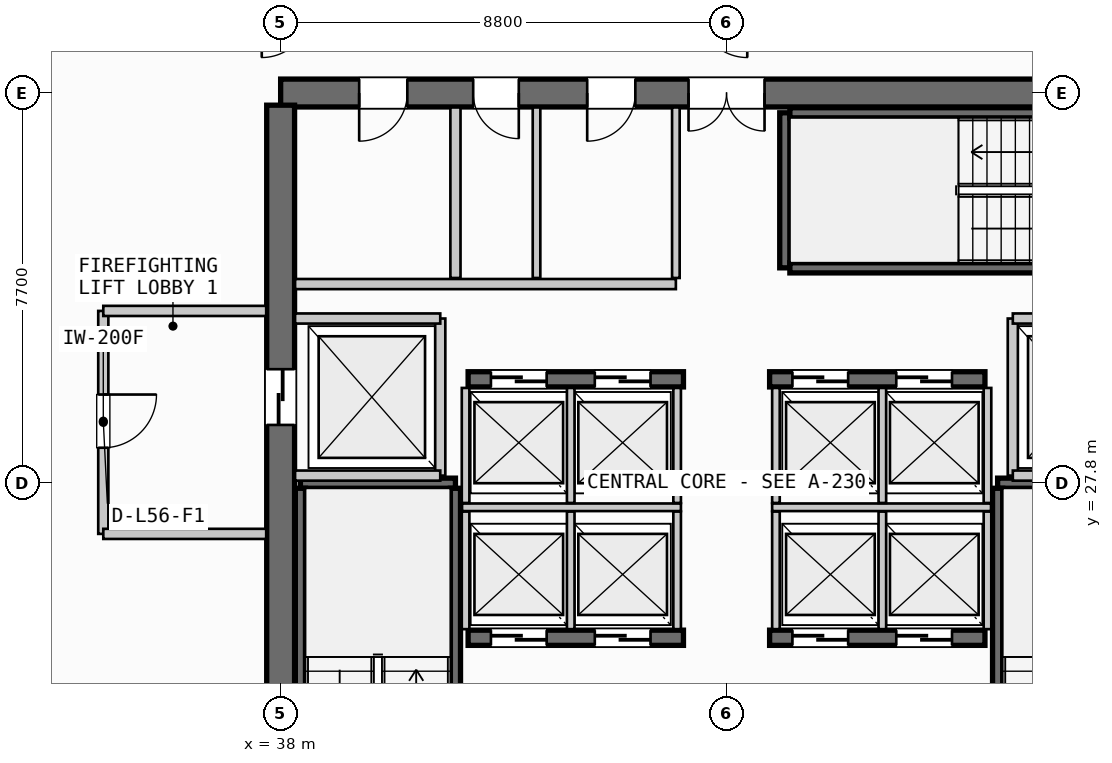
"""IFC4 building model, lengths in metres.
Left out: names, types, materials, properties, quantities, classifications, styles, units other than length and angle.
Written with IfcOpenShell. Run it as: python <this file> out.ifc"""

import sys

from ifc_helpers import new_model, si_unit, direction, frame, frame_2d, origin, place, context, subcontext, project, spatial, rectangle, extrude, source, transform, mapped, element, fill, save


model = new_model("IFC4")
c1 = context("Model", 3, precision=1e-05, world=origin(), true_north=direction((0.0, 1.0)))
c2 = subcontext(c1, "Body", "Model", "MODEL_VIEW")
j1 = project(units=[si_unit("LENGTHUNIT", "METRE"), si_unit("PLANEANGLEUNIT", "RADIAN")], contexts=[c1])
p1 = place(None, origin())
s1 = spatial("IfcSite", under=j1, at=p1, CompositionType="ELEMENT")
p2 = place(p1, origin())
s2 = spatial("IfcBuilding", under=s1, at=p2, CompositionType="ELEMENT")
p3 = place(p2, frame((0.0, 0.0, 214.9)))
s3 = spatial("IfcBuildingStorey", under=s2, at=p3, CompositionType="ELEMENT", Elevation=214.9)
p4 = place(p3, frame((55.6, 35.5, 0.0), z_axis=(0.0, 0.0, 1.0), x_axis=(-1.0, 0.0, 0.0)))
e1 = element("IfcWall", 1, at=p4, inside=s3, PredefinedType="SHEAR", context=c2, shape_type="SweptSolid", body=[
    extrude(rectangle(XDim=17.6, YDim=0.55, at=frame_2d((8.8, 0.0))), origin(), (0.0, 0.0, 1.0), 3.24),
])
p5 = place(p4, frame((8.05, 0.0, 0.0)))
e2 = element("IfcOpeningElement", 2, at=p5, cuts=e1, PredefinedType="OPENING", context=c2, shape_type="SweptSolid", body=[
    extrude(rectangle(XDim=1.5, YDim=2.2, at=frame_2d((0.75, 1.1))), frame((0.0, 0.285, 0.0), z_axis=(0.0, -1.0, 0.0), x_axis=(1.0, 0.0, 0.0)), (0.0, 0.0, 1.0), 0.57),
])
p6 = place(p4, frame((15.1, 0.0, 0.0)))
e3 = element("IfcOpeningElement", 3, at=p6, cuts=e1, PredefinedType="OPENING", context=c2, shape_type="SweptSolid", body=[
    extrude(rectangle(XDim=0.95, YDim=2.15, at=frame_2d((0.475, 1.075))), frame((0.0, 0.285, 0.0), z_axis=(0.0, -1.0, 0.0), x_axis=(1.0, 0.0, 0.0)), (0.0, 0.0, 1.0), 0.57),
])
p7 = place(p4, frame((12.9, 0.0, 0.0)))
e4 = element("IfcOpeningElement", 4, at=p7, cuts=e1, PredefinedType="OPENING", context=c2, shape_type="SweptSolid", body=[
    extrude(rectangle(XDim=0.9, YDim=2.15, at=frame_2d((0.45, 1.075))), frame((0.0, 0.285, 0.0), z_axis=(0.0, -1.0, 0.0), x_axis=(1.0, 0.0, 0.0)), (0.0, 0.0, 1.0), 0.57),
])
p8 = place(p4, frame((10.6, 0.0, 0.0)))
e5 = element("IfcOpeningElement", 5, at=p8, cuts=e1, PredefinedType="OPENING", context=c2, shape_type="SweptSolid", body=[
    extrude(rectangle(XDim=0.95, YDim=2.15, at=frame_2d((0.475, 1.075))), frame((0.0, 0.285, 0.0), z_axis=(0.0, -1.0, 0.0), x_axis=(1.0, 0.0, 0.0)), (0.0, 0.0, 1.0), 0.57),
])
p9 = place(p3, frame((38.0, 35.26, 0.0), z_axis=(0.0, 0.0, 1.0), x_axis=(0.0, -1.0, 0.0)))
e6 = element("IfcWall", 6, at=p9, inside=s3, PredefinedType="SHEAR", context=c2, shape_type="SweptSolid", body=[
    extrude(rectangle(XDim=14.92, YDim=0.55, at=frame_2d((7.46, 0.0))), origin(), (0.0, 0.0, 1.0), 3.24),
])
p10 = place(p9, frame((5.21, 0.0, 0.0)))
e7 = element("IfcOpeningElement", 7, at=p10, cuts=e6, PredefinedType="OPENING", context=c2, shape_type="SweptSolid", body=[
    extrude(rectangle(XDim=1.1, YDim=2.2, at=frame_2d((0.55, 1.1))), frame((0.0, 0.285, 0.0), z_axis=(0.0, -1.0, 0.0), x_axis=(1.0, 0.0, 0.0)), (0.0, 0.0, 1.0), 0.57),
])
p11 = place(p3, frame((41.7, 24.75, 0.0), z_axis=(0.0, 0.0, 1.0), x_axis=(1.0, 0.0, 0.0)))
e8 = element("IfcWall", 8, at=p11, inside=s3, PredefinedType="SHEAR", context=c2, shape_type="SweptSolid", body=[
    extrude(rectangle(XDim=4.25, YDim=0.3, at=frame_2d((2.125, 0.0))), origin(), (0.0, 0.0, 1.0), 3.24),
])
p12 = place(p11, frame((0.45, 0.0, 0.0)))
e9 = element("IfcOpeningElement", 9, at=p12, cuts=e8, PredefinedType="OPENING", context=c2, shape_type="SweptSolid", body=[
    extrude(rectangle(XDim=1.1, YDim=2.2, at=frame_2d((0.55, 1.1))), frame((0.0, 0.16, 0.0), z_axis=(0.0, -1.0, 0.0), x_axis=(1.0, 0.0, 0.0)), (0.0, 0.0, 1.0), 0.32),
])
p13 = place(p11, frame((2.5, 0.0, 0.0)))
e10 = element("IfcOpeningElement", 10, at=p13, cuts=e8, PredefinedType="OPENING", context=c2, shape_type="SweptSolid", body=[
    extrude(rectangle(XDim=1.1, YDim=2.2, at=frame_2d((0.55, 1.1))), frame((0.0, 0.16, 0.0), z_axis=(0.0, -1.0, 0.0), x_axis=(1.0, 0.0, 0.0)), (0.0, 0.0, 1.0), 0.32),
])
p14 = place(p3, frame((47.65, 24.75, 0.0), z_axis=(0.0, 0.0, 1.0), x_axis=(1.0, 0.0, 0.0)))
e11 = element("IfcWall", 11, at=p14, inside=s3, PredefinedType="SHEAR", context=c2, shape_type="SweptSolid", body=[
    extrude(rectangle(XDim=4.25, YDim=0.3, at=frame_2d((2.125, 0.0))), origin(), (0.0, 0.0, 1.0), 3.24),
])
p15 = place(p14, frame((0.45, 0.0, 0.0)))
e12 = element("IfcOpeningElement", 12, at=p15, cuts=e11, PredefinedType="OPENING", context=c2, shape_type="SweptSolid", body=[
    extrude(rectangle(XDim=1.1, YDim=2.2, at=frame_2d((0.55, 1.1))), frame((0.0, 0.16, 0.0), z_axis=(0.0, -1.0, 0.0), x_axis=(1.0, 0.0, 0.0)), (0.0, 0.0, 1.0), 0.32),
])
p16 = place(p14, frame((2.5, 0.0, 0.0)))
e13 = element("IfcOpeningElement", 13, at=p16, cuts=e11, PredefinedType="OPENING", context=c2, shape_type="SweptSolid", body=[
    extrude(rectangle(XDim=1.1, YDim=2.2, at=frame_2d((0.55, 1.1))), frame((0.0, 0.16, 0.0), z_axis=(0.0, -1.0, 0.0), x_axis=(1.0, 0.0, 0.0)), (0.0, 0.0, 1.0), 0.32),
])
p17 = place(p3, frame((41.7, 29.85, 0.0), z_axis=(0.0, 0.0, 1.0), x_axis=(1.0, 0.0, 0.0)))
e14 = element("IfcWall", 14, at=p17, inside=s3, PredefinedType="SHEAR", context=c2, shape_type="SweptSolid", body=[
    extrude(rectangle(XDim=4.25, YDim=0.3, at=frame_2d((2.125, 0.0))), origin(), (0.0, 0.0, 1.0), 3.24),
])
p18 = place(p17, frame((0.45, 0.0, 0.0)))
e15 = element("IfcOpeningElement", 15, at=p18, cuts=e14, PredefinedType="OPENING", context=c2, shape_type="SweptSolid", body=[
    extrude(rectangle(XDim=1.1, YDim=2.2, at=frame_2d((0.55, 1.1))), frame((0.0, 0.16, 0.0), z_axis=(0.0, -1.0, 0.0), x_axis=(1.0, 0.0, 0.0)), (0.0, 0.0, 1.0), 0.32),
])
p19 = place(p17, frame((2.5, 0.0, 0.0)))
e16 = element("IfcOpeningElement", 16, at=p19, cuts=e14, PredefinedType="OPENING", context=c2, shape_type="SweptSolid", body=[
    extrude(rectangle(XDim=1.1, YDim=2.2, at=frame_2d((0.55, 1.1))), frame((0.0, 0.16, 0.0), z_axis=(0.0, -1.0, 0.0), x_axis=(1.0, 0.0, 0.0)), (0.0, 0.0, 1.0), 0.32),
])
p20 = place(p3, frame((47.65, 29.85, 0.0), z_axis=(0.0, 0.0, 1.0), x_axis=(1.0, 0.0, 0.0)))
e17 = element("IfcWall", 17, at=p20, inside=s3, PredefinedType="SHEAR", context=c2, shape_type="SweptSolid", body=[
    extrude(rectangle(XDim=4.25, YDim=0.3, at=frame_2d((2.125, 0.0))), origin(), (0.0, 0.0, 1.0), 3.24),
])
p21 = place(p20, frame((0.45, 0.0, 0.0)))
e18 = element("IfcOpeningElement", 18, at=p21, cuts=e17, PredefinedType="OPENING", context=c2, shape_type="SweptSolid", body=[
    extrude(rectangle(XDim=1.1, YDim=2.2, at=frame_2d((0.55, 1.1))), frame((0.0, 0.16, 0.0), z_axis=(0.0, -1.0, 0.0), x_axis=(1.0, 0.0, 0.0)), (0.0, 0.0, 1.0), 0.32),
])
p22 = place(p20, frame((2.5, 0.0, 0.0)))
e19 = element("IfcOpeningElement", 19, at=p22, cuts=e17, PredefinedType="OPENING", context=c2, shape_type="SweptSolid", body=[
    extrude(rectangle(XDim=1.1, YDim=2.2, at=frame_2d((0.55, 1.1))), frame((0.0, 0.16, 0.0), z_axis=(0.0, -1.0, 0.0), x_axis=(1.0, 0.0, 0.0)), (0.0, 0.0, 1.0), 0.32),
])
p23 = place(p3, frame((38.39, 27.8, 0.0), z_axis=(0.0, 0.0, 1.0), x_axis=(1.0, 0.0, 0.0)))
e20 = element("IfcWall", 20, at=p23, inside=s3, PredefinedType="SHEAR", context=c2, shape_type="SweptSolid", body=[
    extrude(rectangle(XDim=3.06, YDim=0.2, at=frame_2d((1.53, 0.0))), origin(), (0.0, 0.0, 1.0), 3.24),
])
for number, where, z_axis, x_axis in (
    (21, (41.45, 27.7, 0.0), (0.0, 0.0, 1.0), (0.0, -1.0, 0.0)),
    (22, (38.39, 20.35, 0.0), (0.0, 0.0, 1.0), (0.0, 1.0, 0.0)),
):
    element("IfcWall", number, at=place(p3, frame(where, z_axis=z_axis, x_axis=x_axis)), inside=s3, PredefinedType="SHEAR", context=c2, shape_type="SweptSolid", body=[
        extrude(rectangle(XDim=7.35, YDim=0.2, at=frame_2d((3.675, 0.0))), origin(), (0.0, 0.0, 1.0), 3.24),
    ])
p24 = place(p3, frame((52.15, 27.8, 0.0), z_axis=(0.0, 0.0, 1.0), x_axis=(1.0, 0.0, 0.0)))
e23 = element("IfcWall", 23, at=p24, inside=s3, PredefinedType="SHEAR", context=c2, shape_type="SweptSolid", body=[
    extrude(rectangle(XDim=3.06, YDim=0.2, at=frame_2d((1.53, 0.0))), origin(), (0.0, 0.0, 1.0), 3.24),
])
p25 = place(p3, frame((52.15, 20.35, 0.0), z_axis=(0.0, 0.0, 1.0), x_axis=(0.0, 1.0, 0.0)))
e24 = element("IfcWall", 24, at=p25, inside=s3, PredefinedType="SHEAR", context=c2, shape_type="SweptSolid", body=[
    extrude(rectangle(XDim=7.35, YDim=0.2, at=frame_2d((3.675, 0.0))), origin(), (0.0, 0.0, 1.0), 3.24),
])
p26 = place(p3, frame((47.95, 32.05, 0.0), z_axis=(0.0, 0.0, 1.0), x_axis=(0.0, 1.0, 0.0)))
e25 = element("IfcWall", 25, at=p26, inside=s3, PredefinedType="SHEAR", context=c2, shape_type="SweptSolid", body=[
    extrude(rectangle(XDim=3.06, YDim=0.2, at=frame_2d((1.53, 0.0))), origin(), (0.0, 0.0, 1.0), 3.24),
])
for number, where, z_axis, x_axis in (
    (26, (48.05, 35.11, 0.0), (0.0, 0.0, 1.0), (1.0, 0.0, 0.0)),
    (27, (55.4, 32.05, 0.0), (0.0, 0.0, 1.0), (-1.0, 0.0, 0.0)),
):
    element("IfcWall", number, at=place(p3, frame(where, z_axis=z_axis, x_axis=x_axis)), inside=s3, PredefinedType="SHEAR", context=c2, shape_type="SweptSolid", body=[
        extrude(rectangle(XDim=7.35, YDim=0.2, at=frame_2d((3.675, 0.0))), origin(), (0.0, 0.0, 1.0), 3.24),
    ])
p27 = place(p3, frame((41.15, 27.95, 0.0), z_axis=(0.0, 0.0, 1.0), x_axis=(0.0, 1.0, 0.0)))
e28 = element("IfcWall", 28, at=p27, inside=s3, PredefinedType="PARTITIONING", context=c2, shape_type="SweptSolid", body=[
    extrude(rectangle(XDim=3.1, YDim=0.2, at=frame_2d((1.55, 0.0))), origin(), (0.0, 0.0, 1.0), 2.295),
])
for number, where, z_axis, x_axis in (
    (29, (38.285, 27.95, 0.0), (0.0, 0.0, 1.0), (1.0, 0.0, 0.0)),
    (30, (38.285, 31.05, 0.0), (0.0, 0.0, 1.0), (1.0, 0.0, 0.0)),
):
    element("IfcWall", number, at=place(p3, frame(where, z_axis=z_axis, x_axis=x_axis)), inside=s3, PredefinedType="PARTITIONING", context=c2, shape_type="SweptSolid", body=[
        extrude(rectangle(XDim=2.865, YDim=0.2, at=frame_2d((1.433, 0.0))), origin(), (0.0, 0.0, 1.0), 2.295),
    ])
p28 = place(p3, frame((34.5, 31.2, 0.0), z_axis=(0.0, 0.0, 1.0), x_axis=(0.0, -1.0, 0.0)))
e31 = element("IfcWall", 31, at=p28, inside=s3, PredefinedType="PARTITIONING", context=c2, shape_type="SweptSolid", body=[
    extrude(rectangle(XDim=4.4, YDim=0.2, at=frame_2d((2.2, 0.0))), origin(), (0.0, 0.0, 1.0), 2.295),
])
p29 = place(p28, frame((1.65, 0.0, 0.0)))
e32 = element("IfcOpeningElement", 32, at=p29, cuts=e31, PredefinedType="OPENING", context=c2, shape_type="SweptSolid", body=[
    extrude(rectangle(XDim=1.05, YDim=2.15, at=frame_2d((0.525, 1.075))), frame((0.0, 0.11, 0.0), z_axis=(0.0, -1.0, 0.0), x_axis=(1.0, 0.0, 0.0)), (0.0, 0.0, 1.0), 0.22),
])
for number, where, z_axis, x_axis in (
    (33, (34.5, 26.8, 0.0), (0.0, 0.0, 1.0), (1.0, 0.0, 0.0)),
    (34, (34.5, 31.2, 0.0), (0.0, 0.0, 1.0), (1.0, 0.0, 0.0)),
):
    element("IfcWall", number, at=place(p3, frame(where, z_axis=z_axis, x_axis=x_axis)), inside=s3, PredefinedType="PARTITIONING", context=c2, shape_type="SweptSolid", body=[
        extrude(rectangle(XDim=3.215, YDim=0.2, at=frame_2d((1.607, 0.0))), origin(), (0.0, 0.0, 1.0), 2.295),
    ])
p30 = place(p3, frame((52.45, 27.95, 0.0), z_axis=(0.0, 0.0, 1.0), x_axis=(0.0, 1.0, 0.0)))
e35 = element("IfcWall", 35, at=p30, inside=s3, PredefinedType="PARTITIONING", context=c2, shape_type="SweptSolid", body=[
    extrude(rectangle(XDim=3.1, YDim=0.2, at=frame_2d((1.55, 0.0))), origin(), (0.0, 0.0, 1.0), 2.295),
])
for number, where, z_axis, x_axis in (
    (36, (52.45, 27.95, 0.0), (0.0, 0.0, 1.0), (1.0, 0.0, 0.0)),
    (37, (52.45, 31.05, 0.0), (0.0, 0.0, 1.0), (1.0, 0.0, 0.0)),
):
    element("IfcWall", number, at=place(p3, frame(where, z_axis=z_axis, x_axis=x_axis)), inside=s3, PredefinedType="PARTITIONING", context=c2, shape_type="SweptSolid", body=[
        extrude(rectangle(XDim=2.865, YDim=0.2, at=frame_2d((1.433, 0.0))), origin(), (0.0, 0.0, 1.0), 2.295),
    ])
p31 = place(p3, frame((41.58, 27.325, 0.0), z_axis=(0.0, 0.0, 1.0), x_axis=(1.0, 0.0, 0.0)))
e38 = element("IfcWall", 38, at=p31, inside=s3, PredefinedType="PARTITIONING", context=c2, shape_type="SweptSolid", body=[
    extrude(rectangle(XDim=4.32, YDim=0.15, at=frame_2d((2.16, 0.0))), origin(), (0.0, 0.0, 1.0), 2.295),
])
p32 = place(p3, frame((47.7, 27.325, 0.0), z_axis=(0.0, 0.0, 1.0), x_axis=(1.0, 0.0, 0.0)))
e39 = element("IfcWall", 39, at=p32, inside=s3, PredefinedType="PARTITIONING", context=c2, shape_type="SweptSolid", body=[
    extrude(rectangle(XDim=4.32, YDim=0.15, at=frame_2d((2.16, 0.0))), origin(), (0.0, 0.0, 1.0), 2.295),
])
for number, where, z_axis, x_axis in (
    (40, (41.65, 24.92, 0.0), (0.0, 0.0, 1.0), (0.0, 1.0, 0.0)),
    (41, (43.725, 24.92, 0.0), (0.0, 0.0, 1.0), (0.0, 1.0, 0.0)),
    (42, (45.825, 24.92, 0.0), (0.0, 0.0, 1.0), (0.0, 1.0, 0.0)),
    (43, (47.775, 24.92, 0.0), (0.0, 0.0, 1.0), (0.0, 1.0, 0.0)),
    (44, (49.875, 24.92, 0.0), (0.0, 0.0, 1.0), (0.0, 1.0, 0.0)),
    (45, (51.95, 24.92, 0.0), (0.0, 0.0, 1.0), (0.0, 1.0, 0.0)),
):
    element("IfcWall", number, at=place(p3, frame(where, z_axis=z_axis, x_axis=x_axis)), inside=s3, PredefinedType="PARTITIONING", context=c2, shape_type="SweptSolid", body=[
        extrude(rectangle(XDim=2.32, YDim=0.15, at=frame_2d((1.16, 0.0))), origin(), (0.0, 0.0, 1.0), 2.295),
    ])
for number, where, z_axis, x_axis in (
    (46, (41.65, 27.41, 0.0), (0.0, 0.0, 1.0), (0.0, 1.0, 0.0)),
    (47, (43.725, 27.41, 0.0), (0.0, 0.0, 1.0), (0.0, 1.0, 0.0)),
    (48, (45.825, 27.41, 0.0), (0.0, 0.0, 1.0), (0.0, 1.0, 0.0)),
    (49, (47.775, 27.41, 0.0), (0.0, 0.0, 1.0), (0.0, 1.0, 0.0)),
    (50, (49.875, 27.41, 0.0), (0.0, 0.0, 1.0), (0.0, 1.0, 0.0)),
    (51, (51.95, 27.41, 0.0), (0.0, 0.0, 1.0), (0.0, 1.0, 0.0)),
):
    element("IfcWall", number, at=place(p3, frame(where, z_axis=z_axis, x_axis=x_axis)), inside=s3, PredefinedType="PARTITIONING", context=c2, shape_type="SweptSolid", body=[
        extrude(rectangle(XDim=2.27, YDim=0.15, at=frame_2d((1.135, 0.0))), origin(), (0.0, 0.0, 1.0), 2.295),
    ])
p33 = place(p3, frame((41.45, 31.85, 0.0), z_axis=(0.0, 0.0, 1.0), x_axis=(0.0, 1.0, 0.0)))
e52 = element("IfcWall", 52, at=p33, inside=s3, PredefinedType="PARTITIONING", context=c2, shape_type="SweptSolid", body=[
    extrude(rectangle(XDim=3.365, YDim=0.2, at=frame_2d((1.683, 0.0))), origin(), (0.0, 0.0, 1.0), 2.295),
])
p34 = place(p3, frame((38.285, 31.73, 0.0), z_axis=(0.0, 0.0, 1.0), x_axis=(1.0, 0.0, 0.0)))
e53 = element("IfcWall", 53, at=p34, inside=s3, PredefinedType="PARTITIONING", context=c2, shape_type="SweptSolid", body=[
    extrude(rectangle(XDim=7.515, YDim=0.2, at=frame_2d((3.758, 0.0))), origin(), (0.0, 0.0, 1.0), 2.295),
])
p35 = place(p3, frame((45.8, 31.85, 0.0), z_axis=(0.0, 0.0, 1.0), x_axis=(0.0, 1.0, 0.0)))
e54 = element("IfcWall", 54, at=p35, inside=s3, PredefinedType="PARTITIONING", context=c2, shape_type="SweptSolid", body=[
    extrude(rectangle(XDim=3.365, YDim=0.15, at=frame_2d((1.683, 0.0))), origin(), (0.0, 0.0, 1.0), 2.295),
])
p36 = place(p3, frame((43.05, 31.85, 0.0), z_axis=(0.0, 0.0, 1.0), x_axis=(0.0, 1.0, 0.0)))
e55 = element("IfcWall", 55, at=p36, inside=s3, PredefinedType="PLUMBINGWALL", context=c2, shape_type="SweptSolid", body=[
    extrude(rectangle(XDim=3.365, YDim=0.15, at=frame_2d((1.683, 0.0))), origin(), (0.0, 0.0, 1.0), 2.295),
])
m1 = source(origin(), c2, "Body", "SweptSolid", [
    extrude(rectangle(XDim=1.5, YDim=2.2, at=frame_2d((0.75, 1.1))), frame((0.0, 0.025, 0.0), z_axis=(0.0, -1.0, 0.0), x_axis=(1.0, 0.0, 0.0)), (0.0, 0.0, 1.0), 0.05),
])
p37 = place(p5, origin())
e56 = element("IfcDoor", 56, at=p37, inside=s3, OperationType="DOUBLE_DOOR_SINGLE_SWING", PredefinedType="DOOR", context=c2, shape_type="MappedRepresentation", body=[
    mapped(m1, transform((0.0, 0.0, 0.0), scale=1.0)),
])
fill(e2, e56)
m2 = source(origin(), c2, "Body", "SweptSolid", [
    extrude(rectangle(XDim=1.1, YDim=2.2, at=frame_2d((0.55, 1.1))), frame((0.0, 0.025, 0.0), z_axis=(0.0, -1.0, 0.0), x_axis=(1.0, 0.0, 0.0)), (0.0, 0.0, 1.0), 0.05),
])
p38 = place(p10, origin())
e57 = element("IfcDoor", 57, at=p38, inside=s3, OperationType="SLIDING_TO_LEFT", PredefinedType="DOOR", context=c2, shape_type="MappedRepresentation", body=[
    mapped(m2, transform((0.0, 0.0, 0.0), scale=1.0)),
])
fill(e7, e57)
p39 = place(p12, origin())
e58 = element("IfcDoor", 58, at=p39, inside=s3, OperationType="SLIDING_TO_RIGHT", PredefinedType="DOOR", context=c2, shape_type="MappedRepresentation", body=[
    mapped(m2, transform((0.0, 0.0, 0.0), scale=1.0)),
])
fill(e9, e58)
p40 = place(p13, origin())
e59 = element("IfcDoor", 59, at=p40, inside=s3, OperationType="SLIDING_TO_RIGHT", PredefinedType="DOOR", context=c2, shape_type="MappedRepresentation", body=[
    mapped(m2, transform((0.0, 0.0, 0.0), scale=1.0)),
])
fill(e10, e59)
p41 = place(p15, origin())
e60 = element("IfcDoor", 60, at=p41, inside=s3, OperationType="SLIDING_TO_RIGHT", PredefinedType="DOOR", context=c2, shape_type="MappedRepresentation", body=[
    mapped(m2, transform((0.0, 0.0, 0.0), scale=1.0)),
])
fill(e12, e60)
p42 = place(p16, origin())
e61 = element("IfcDoor", 61, at=p42, inside=s3, OperationType="SLIDING_TO_RIGHT", PredefinedType="DOOR", context=c2, shape_type="MappedRepresentation", body=[
    mapped(m2, transform((0.0, 0.0, 0.0), scale=1.0)),
])
fill(e13, e61)
p43 = place(p18, origin())
e62 = element("IfcDoor", 62, at=p43, inside=s3, OperationType="SLIDING_TO_LEFT", PredefinedType="DOOR", context=c2, shape_type="MappedRepresentation", body=[
    mapped(m2, transform((0.0, 0.0, 0.0), scale=1.0)),
])
fill(e15, e62)
p44 = place(p19, origin())
e63 = element("IfcDoor", 63, at=p44, inside=s3, OperationType="SLIDING_TO_LEFT", PredefinedType="DOOR", context=c2, shape_type="MappedRepresentation", body=[
    mapped(m2, transform((0.0, 0.0, 0.0), scale=1.0)),
])
fill(e16, e63)
p45 = place(p21, origin())
e64 = element("IfcDoor", 64, at=p45, inside=s3, OperationType="SLIDING_TO_LEFT", PredefinedType="DOOR", context=c2, shape_type="MappedRepresentation", body=[
    mapped(m2, transform((0.0, 0.0, 0.0), scale=1.0)),
])
fill(e18, e64)
p46 = place(p22, origin())
e65 = element("IfcDoor", 65, at=p46, inside=s3, OperationType="SLIDING_TO_LEFT", PredefinedType="DOOR", context=c2, shape_type="MappedRepresentation", body=[
    mapped(m2, transform((0.0, 0.0, 0.0), scale=1.0)),
])
fill(e19, e65)
m3 = source(origin(), c2, "Body", "SweptSolid", [
    extrude(rectangle(XDim=0.95, YDim=2.15, at=frame_2d((0.475, 1.075))), frame((0.0, 0.025, 0.0), z_axis=(0.0, -1.0, 0.0), x_axis=(1.0, 0.0, 0.0)), (0.0, 0.0, 1.0), 0.05),
])
p47 = place(p6, origin())
e66 = element("IfcDoor", 66, at=p47, inside=s3, OperationType="SINGLE_SWING_RIGHT", PredefinedType="DOOR", context=c2, shape_type="MappedRepresentation", body=[
    mapped(m3, transform((0.0, 0.0, 0.0), scale=1.0)),
])
fill(e3, e66)
m4 = source(origin(), c2, "Body", "SweptSolid", [
    extrude(rectangle(XDim=0.9, YDim=2.15, at=frame_2d((0.45, 1.075))), frame((0.0, 0.025, 0.0), z_axis=(0.0, -1.0, 0.0), x_axis=(1.0, 0.0, 0.0)), (0.0, 0.0, 1.0), 0.05),
])
p48 = place(p7, origin())
e67 = element("IfcDoor", 67, at=p48, inside=s3, OperationType="SINGLE_SWING_LEFT", PredefinedType="DOOR", context=c2, shape_type="MappedRepresentation", body=[
    mapped(m4, transform((0.0, 0.0, 0.0), scale=1.0)),
])
fill(e4, e67)
p49 = place(p8, origin())
e68 = element("IfcDoor", 68, at=p49, inside=s3, OperationType="SINGLE_SWING_RIGHT", PredefinedType="DOOR", context=c2, shape_type="MappedRepresentation", body=[
    mapped(m3, transform((0.0, 0.0, 0.0), scale=1.0)),
])
fill(e5, e68)
m5 = source(origin(), c2, "Body", "SweptSolid", [
    extrude(rectangle(XDim=1.05, YDim=2.15, at=frame_2d((0.525, 1.075))), frame((0.0, 0.025, 0.0), z_axis=(0.0, -1.0, 0.0), x_axis=(1.0, 0.0, 0.0)), (0.0, 0.0, 1.0), 0.05),
])
p50 = place(p29, origin())
e69 = element("IfcDoor", 69, at=p50, inside=s3, OperationType="SINGLE_SWING_LEFT", PredefinedType="DOOR", context=c2, shape_type="MappedRepresentation", body=[
    mapped(m5, transform((0.0, 0.0, 0.0), scale=1.0)),
])
fill(e32, e69)
save(model, sys.argv[1])
